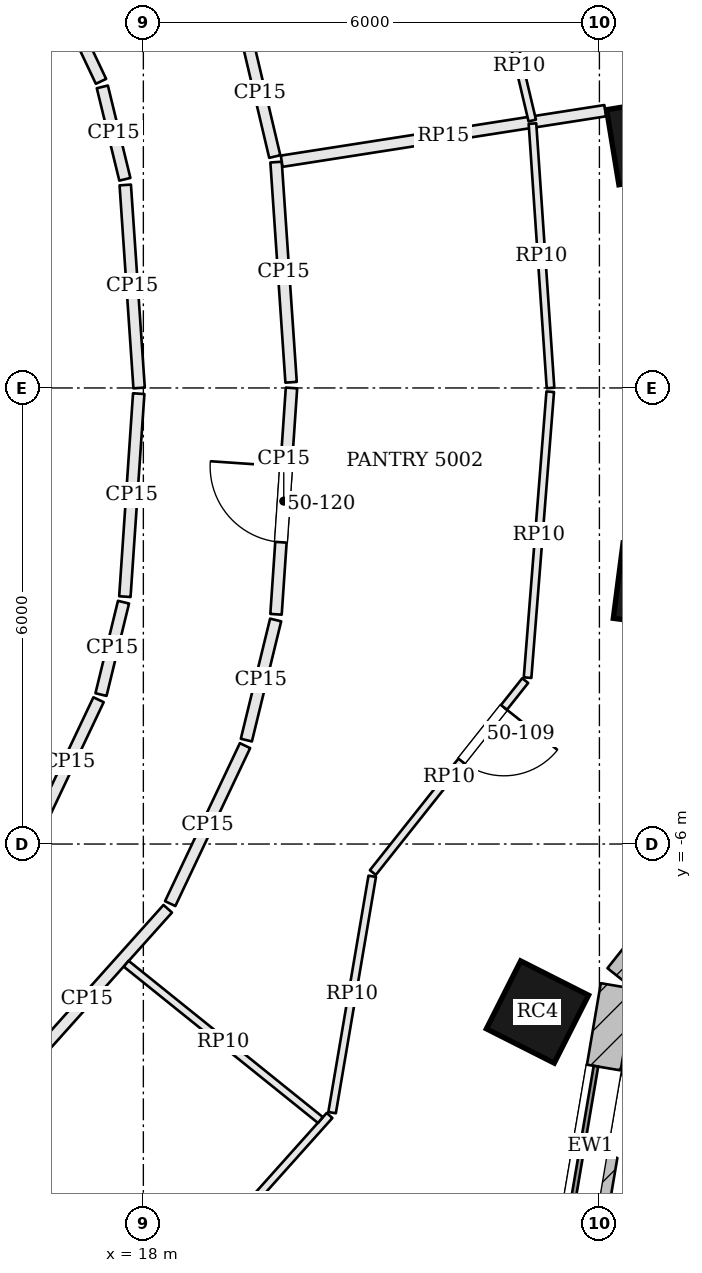
"""IFC4 building model, lengths in metres.
Left out: names, types, materials, properties, quantities, classifications, styles, units other than length and angle.
Written with IfcOpenShell. Run it as: python <this file> out.ifc"""

import sys

from ifc_helpers import new_model, si_unit, direction, frame, frame_2d, origin, origin_2d, place, context, subcontext, project, spatial, rectangle, extrude, element, fill, save


model = new_model("IFC4")
c1 = context("Model", 3, precision=1e-05, world=origin(), true_north=direction((0.0, 1.0)))
c2 = subcontext(c1, "Body", "Model", "MODEL_VIEW")
j1 = project(units=[si_unit("LENGTHUNIT", "METRE"), si_unit("PLANEANGLEUNIT", "RADIAN")], contexts=[c1])
p1 = place(None, origin())
s1 = spatial("IfcSite", under=j1, at=p1, CompositionType="ELEMENT")
p2 = place(p1, origin())
s2 = spatial("IfcBuilding", under=s1, at=p2, CompositionType="ELEMENT")
p3 = place(p2, frame((0.0, 0.0, 205.2)))
s3 = spatial("IfcBuildingStorey", under=s2, at=p3, CompositionType="ELEMENT", Elevation=205.2)
for number, where, z_axis, x_axis in (
    (1, (24.669, 3.248, 0.0), (0.0, 0.0, 1.0), (-0.162, 0.987, 0.0)),
    (2, (23.185, -8.21, 0.0), (0.0, 0.0, 1.0), (0.451, 0.893, 0.0)),
    (3, (24.743, -2.599, 0.0), (0.0, 0.0, 1.0), (0.128, 0.992, 0.0)),
):
    element("IfcColumn", number, at=place(p3, frame(where, z_axis=z_axis, x_axis=x_axis)), inside=s3, PredefinedType="COLUMN", context=c2, shape_type="SweptSolid", body=[
        extrude(rectangle(XDim=1.0, YDim=1.0, at=origin_2d()), origin(), (0.0, 0.0, 1.0), 3.9),
    ])
p4 = place(p3, frame((23.524, -12.083, 0.0), z_axis=(0.0, 0.0, 1.0), x_axis=(0.167445072349, 0.985881406532, 0.0)))
e4 = element("IfcWall", 4, at=p4, inside=s3, PredefinedType="SOLIDWALL", context=c2, shape_type="SweptSolid", body=[
    extrude(rectangle(XDim=4.275, YDim=0.45, at=frame_2d((2.137, 0.0))), origin(), (0.0, 0.0, 1.0), 3.7),
])
p5 = place(p4, frame((1.087, 0.0, 0.9)))
e5 = element("IfcOpeningElement", 5, at=p5, cuts=e4, PredefinedType="OPENING", context=c2, shape_type="SweptSolid", body=[
    extrude(rectangle(XDim=2.1, YDim=2.3, at=frame_2d((1.05, 1.15))), frame((0.0, 0.235, 0.0), z_axis=(0.0, -1.0, 0.0), x_axis=(1.0, 0.0, 0.0)), (0.0, 0.0, 1.0), 0.47),
])
p6 = place(p3, frame((24.282, -7.774, 0.0), z_axis=(0.0, 0.0, 1.0), x_axis=(0.621735490397, 0.783227285008, 0.0)))
e6 = element("IfcWall", 6, at=p6, inside=s3, PredefinedType="SOLIDWALL", context=c2, shape_type="SweptSolid", body=[
    extrude(rectangle(XDim=4.625, YDim=0.45, at=frame_2d((2.312, 0.0))), origin(), (0.0, 0.0, 1.0), 3.7),
])
p7 = place(p6, frame((1.262, 0.0, 0.9)))
e7 = element("IfcOpeningElement", 7, at=p7, cuts=e6, PredefinedType="OPENING", context=c2, shape_type="SweptSolid", body=[
    extrude(rectangle(XDim=2.1, YDim=2.3, at=frame_2d((1.05, 1.15))), frame((0.0, 0.235, 0.0), z_axis=(0.0, -1.0, 0.0), x_axis=(1.0, 0.0, 0.0)), (0.0, 0.0, 1.0), 0.47),
])
p8 = place(p3, frame((23.745, -12.125, 3.9), z_axis=(0.0, 0.0, 1.0), x_axis=(0.16743218322, 0.985883595574, 0.0)))
e8 = element("IfcWall", 8, at=p8, inside=s3, PredefinedType="PARAPET", context=c2, shape_type="SweptSolid", body=[
    extrude(rectangle(XDim=2.049, YDim=0.3, at=frame_2d((1.024, 0.0))), origin(), (0.0, 0.0, 1.0), 1.1),
])
p9 = place(p3, frame((16.193, -9.229, 0.0), z_axis=(0.0, 0.0, 1.0), x_axis=(0.666882089048, 0.745163256815, 0.0)))
e9 = element("IfcWall", 9, at=p9, inside=s3, PredefinedType="PARTITIONING", context=c2, shape_type="SweptSolid", body=[
    extrude(rectangle(XDim=3.19, YDim=0.15, at=frame_2d((1.595, 0.0))), origin(), (0.0, 0.0, 1.0), 3.084),
])
p10 = place(p3, frame((18.353, -6.784, 0.0), z_axis=(0.0, 0.0, 1.0), x_axis=(0.428086344739, 0.903737838894, 0.0)))
e10 = element("IfcWall", 10, at=p10, inside=s3, PredefinedType="PARTITIONING", context=c2, shape_type="SweptSolid", body=[
    extrude(rectangle(XDim=2.3, YDim=0.15, at=frame_2d((1.15, 0.0))), origin(), (0.0, 0.0, 1.0), 3.084),
])
p11 = place(p3, frame((19.355, -4.633, 0.0), z_axis=(0.0, 0.0, 1.0), x_axis=(0.236703930685, 0.971581828359, 0.0)))
e11 = element("IfcWall", 11, at=p11, inside=s3, PredefinedType="PARTITIONING", context=c2, shape_type="SweptSolid", body=[
    extrude(rectangle(XDim=1.626, YDim=0.15, at=frame_2d((0.813, 0.0))), origin(), (0.0, 0.0, 1.0), 3.084),
])
p12 = place(p3, frame((19.745, -2.978, 0.0), z_axis=(0.0, 0.0, 1.0), x_axis=(0.068142324, 0.997675610447, 0.0)))
e12 = element("IfcWall", 12, at=p12, inside=s3, PredefinedType="PARTITIONING", context=c2, shape_type="SweptSolid", body=[
    extrude(rectangle(XDim=2.984, YDim=0.15, at=frame_2d((1.492, 0.0))), origin(), (0.0, 0.0, 1.0), 3.084),
])
p13 = place(p12, frame((0.95, 0.0, 0.0)))
e13 = element("IfcOpeningElement", 13, at=p13, cuts=e12, PredefinedType="OPENING", context=c2, shape_type="SweptSolid", body=[
    extrude(rectangle(XDim=1.0, YDim=2.1, at=frame_2d((0.5, 1.05))), frame((0.0, 0.085, 0.0), z_axis=(0.0, -1.0, 0.0), x_axis=(1.0, 0.0, 0.0)), (0.0, 0.0, 1.0), 0.17),
])
p14 = place(p3, frame((19.944, 0.075, 0.0), z_axis=(0.0, 0.0, 1.0), x_axis=(-0.068109486785, 0.997677852721, 0.0)))
e14 = element("IfcWall", 14, at=p14, inside=s3, PredefinedType="PARTITIONING", context=c2, shape_type="SweptSolid", body=[
    extrude(rectangle(XDim=2.904, YDim=0.15, at=frame_2d((1.452, 0.0))), origin(), (0.0, 0.0, 1.0), 3.084),
])
p15 = place(p3, frame((24.077, 3.648, 0.0), z_axis=(0.0, 0.0, 1.0), x_axis=(-0.988022565711, -0.15430946065, 0.0)))
e15 = element("IfcWall", 15, at=p15, inside=s3, PredefinedType="PARTITIONING", context=c2, shape_type="SweptSolid", body=[
    extrude(rectangle(XDim=4.308, YDim=0.15, at=frame_2d((2.154, 0.0))), origin(), (0.0, 0.0, 1.0), 3.184),
])
p16 = place(p3, frame((19.729, 3.044, 0.0), z_axis=(0.0, 0.0, 1.0), x_axis=(-0.229318400324, 0.973351463385, 0.0)))
e16 = element("IfcWall", 16, at=p16, inside=s3, PredefinedType="PARTITIONING", context=c2, shape_type="SweptSolid", body=[
    extrude(rectangle(XDim=1.707, YDim=0.15, at=frame_2d((0.853, 0.0))), origin(), (0.0, 0.0, 1.0), 3.084),
])
p17 = place(p3, frame((16.652, 5.702, 0.0), z_axis=(0.0, 0.0, 1.0), x_axis=(0.428126129773, -0.903718992279, 0.0)))
e17 = element("IfcWall", 17, at=p17, inside=s3, PredefinedType="PARTITIONING", context=c2, shape_type="SweptSolid", body=[
    extrude(rectangle(XDim=1.846, YDim=0.15, at=frame_2d((0.923, 0.0))), origin(), (0.0, 0.0, 1.0), 3.084),
])
p18 = place(p3, frame((17.46, 3.961, 0.0), z_axis=(0.0, 0.0, 1.0), x_axis=(0.236655249498, -0.971593687137, 0.0)))
e18 = element("IfcWall", 18, at=p18, inside=s3, PredefinedType="PARTITIONING", context=c2, shape_type="SweptSolid", body=[
    extrude(rectangle(XDim=1.251, YDim=0.15, at=frame_2d((0.626, 0.0))), origin(), (0.0, 0.0, 1.0), 3.084),
])
p19 = place(p3, frame((17.762, 2.67, 0.0), z_axis=(0.0, 0.0, 1.0), x_axis=(0.068135311644, -0.997676089373, 0.0)))
e19 = element("IfcWall", 19, at=p19, inside=s3, PredefinedType="PARTITIONING", context=c2, shape_type="SweptSolid", body=[
    extrude(rectangle(XDim=2.677, YDim=0.15, at=frame_2d((1.338, 0.0))), origin(), (0.0, 0.0, 1.0), 3.084),
])
p20 = place(p3, frame((17.939, -0.075, 0.0), z_axis=(0.0, 0.0, 1.0), x_axis=(-0.068226099283, -0.99766988497, 0.0)))
e20 = element("IfcWall", 20, at=p20, inside=s3, PredefinedType="PARTITIONING", context=c2, shape_type="SweptSolid", body=[
    extrude(rectangle(XDim=2.677, YDim=0.15, at=frame_2d((1.338, 0.0))), origin(), (0.0, 0.0, 1.0), 3.084),
])
p21 = place(p3, frame((17.739, -2.818, 0.0), z_axis=(0.0, 0.0, 1.0), x_axis=(-0.236884307907, -0.971537865792, 0.0)))
e21 = element("IfcWall", 21, at=p21, inside=s3, PredefinedType="PARTITIONING", context=c2, shape_type="SweptSolid", body=[
    extrude(rectangle(XDim=1.251, YDim=0.15, at=frame_2d((0.625, 0.0))), origin(), (0.0, 0.0, 1.0), 3.084),
])
p22 = place(p3, frame((17.41, -4.102, 0.0), z_axis=(0.0, 0.0, 1.0), x_axis=(-0.428074720318, -0.903743345107, 0.0)))
e22 = element("IfcWall", 22, at=p22, inside=s3, PredefinedType="PARTITIONING", context=c2, shape_type="SweptSolid", body=[
    extrude(rectangle(XDim=1.806, YDim=0.15, at=frame_2d((0.903, 0.0))), origin(), (0.0, 0.0, 1.0), 3.084),
])
p23 = place(p3, frame((23.119, 3.478, 0.0), z_axis=(0.0, 0.0, 1.0), x_axis=(0.068141123735, -0.997675692425, 0.0)))
e23 = element("IfcWall", 23, at=p23, inside=s3, PredefinedType="PARTITIONING", context=c2, shape_type="SweptSolid", body=[
    extrude(rectangle(XDim=3.486, YDim=0.1, at=frame_2d((1.743, 0.0))), origin(), (0.0, 0.0, 1.0), 3.084),
])
p24 = place(p3, frame((23.353, -0.05, 0.0), z_axis=(0.0, 0.0, 1.0), x_axis=(-0.078942785997, -0.996879148412, 0.0)))
e24 = element("IfcWall", 24, at=p24, inside=s3, PredefinedType="PARTITIONING", context=c2, shape_type="SweptSolid", body=[
    extrude(rectangle(XDim=3.773, YDim=0.1, at=frame_2d((1.886, 0.0))), origin(), (0.0, 0.0, 1.0), 3.084),
])
p25 = place(p3, frame((23.024, -3.85, 0.0), z_axis=(0.0, 0.0, 1.0), x_axis=(-0.621707275044, -0.783249681875, 0.0)))
e25 = element("IfcWall", 25, at=p25, inside=s3, PredefinedType="PARTITIONING", context=c2, shape_type="SweptSolid", body=[
    extrude(rectangle(XDim=3.224, YDim=0.1, at=frame_2d((1.612, 0.0))), origin(), (0.0, 0.0, 1.0), 3.084),
])
p26 = place(p25, frame((0.45, 0.0, 0.0)))
e26 = element("IfcOpeningElement", 26, at=p26, cuts=e25, PredefinedType="OPENING", context=c2, shape_type="SweptSolid", body=[
    extrude(rectangle(XDim=0.9, YDim=2.1, at=frame_2d((0.45, 1.05))), frame((0.0, 0.06, 0.0), z_axis=(0.0, -1.0, 0.0), x_axis=(1.0, 0.0, 0.0)), (0.0, 0.0, 1.0), 0.12),
])
p27 = place(p3, frame((21.011, -6.424, 0.0), z_axis=(0.0, 0.0, 1.0), x_axis=(-0.167360753367, -0.985895723813, 0.0)))
e27 = element("IfcWall", 27, at=p27, inside=s3, PredefinedType="PARTITIONING", context=c2, shape_type="SweptSolid", body=[
    extrude(rectangle(XDim=3.154, YDim=0.1, at=frame_2d((1.577, 0.0))), origin(), (0.0, 0.0, 1.0), 3.084),
])
p28 = place(p3, frame((20.45, -9.571, 0.0), z_axis=(0.0, 0.0, 1.0), x_axis=(-0.666910888996, -0.745137481368, 0.0)))
e28 = element("IfcWall", 28, at=p28, inside=s3, PredefinedType="PARTITIONING", context=c2, shape_type="SweptSolid", body=[
    extrude(rectangle(XDim=3.136, YDim=0.1, at=frame_2d((1.568, 0.0))), origin(), (0.0, 0.0, 1.0), 3.084),
])
p29 = place(p3, frame((17.774, -7.575, 0.0), z_axis=(0.0, 0.0, 1.0), x_axis=(0.779013458918, -0.627007201573, 0.0)))
e29 = element("IfcWall", 29, at=p29, inside=s3, PredefinedType="PARTITIONING", context=c2, shape_type="SweptSolid", body=[
    extrude(rectangle(XDim=3.28, YDim=0.1, at=frame_2d((1.64, 0.0))), origin(), (0.0, 0.0, 1.0), 3.084),
])
p30 = place(p3, frame((22.777, 4.951, 0.0), z_axis=(0.0, 0.0, 1.0), x_axis=(0.230701773802, -0.973024507176, 0.0)))
e30 = element("IfcWall", 30, at=p30, inside=s3, PredefinedType="PARTITIONING", context=c2, shape_type="SweptSolid", body=[
    extrude(rectangle(XDim=1.473, YDim=0.1, at=frame_2d((0.737, 0.0))), origin(), (0.0, 0.0, 1.0), 3.084),
])
p31 = place(p5, origin())
e31 = element("IfcWindow", 31, at=p31, inside=s3, PartitioningType="SINGLE_PANEL", PredefinedType="WINDOW", context=c2, shape_type="SweptSolid", body=[
    extrude(rectangle(XDim=2.1, YDim=2.3, at=frame_2d((1.05, 1.15))), frame((0.0, 0.135, 0.0), z_axis=(0.0, -1.0, 0.0), x_axis=(1.0, 0.0, 0.0)), (0.0, 0.0, 1.0), 0.06),
])
fill(e5, e31)
p32 = place(p26, origin())
e32 = element("IfcDoor", 32, at=p32, inside=s3, OperationType="SINGLE_SWING_LEFT", PredefinedType="DOOR", context=c2, shape_type="SweptSolid", body=[
    extrude(rectangle(XDim=0.9, YDim=2.1, at=frame_2d((0.45, 1.05))), frame((0.0, 0.025, 0.0), z_axis=(0.0, -1.0, 0.0), x_axis=(1.0, 0.0, 0.0)), (0.0, 0.0, 1.0), 0.05),
])
fill(e26, e32)
p33 = place(p13, origin())
e33 = element("IfcDoor", 33, at=p33, inside=s3, OperationType="SINGLE_SWING_RIGHT", PredefinedType="DOOR", context=c2, shape_type="SweptSolid", body=[
    extrude(rectangle(XDim=1.0, YDim=2.1, at=frame_2d((0.5, 1.05))), frame((0.0, 0.025, 0.0), z_axis=(0.0, -1.0, 0.0), x_axis=(1.0, 0.0, 0.0)), (0.0, 0.0, 1.0), 0.05),
])
fill(e13, e33)
save(model, sys.argv[1])
